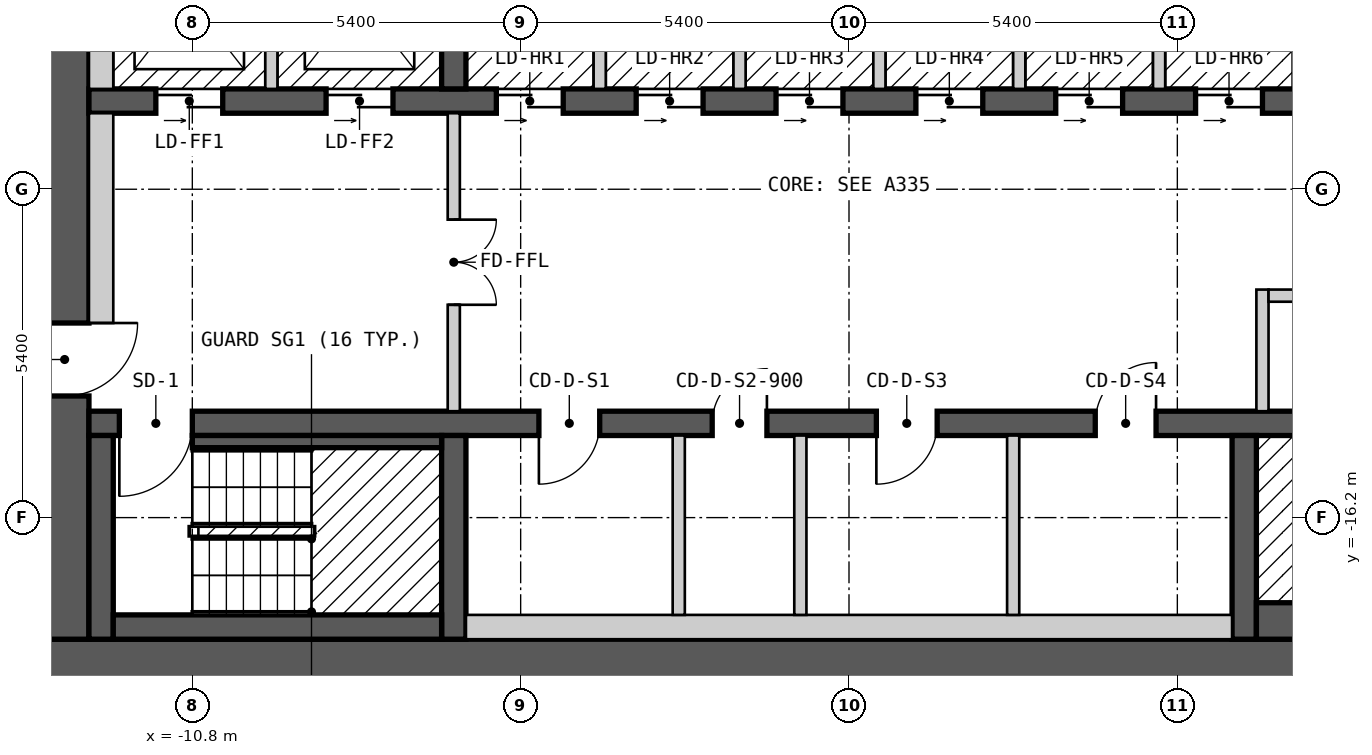
"""IFC4 building model, lengths in metres.
Left out: names, types, materials, properties, quantities, classifications, styles, units other than length and angle.
Written with IfcOpenShell. Run it as: python <this file> out.ifc"""

import sys

from ifc_helpers import new_model, si_unit, direction, frame, frame_2d, origin, place, context, subcontext, project, spatial, rectangle, extrude, element, fill, save


model = new_model("IFC4")
c1 = context("Model", 3, precision=1e-05, world=origin(), true_north=direction((0.0, 1.0)))
c2 = subcontext(c1, "Body", "Model", "MODEL_VIEW")
j1 = project(units=[si_unit("LENGTHUNIT", "METRE"), si_unit("PLANEANGLEUNIT", "RADIAN")], contexts=[c1])
p1 = place(None, origin())
s1 = spatial("IfcSite", under=j1, at=p1, CompositionType="ELEMENT")
p2 = place(p1, origin())
s2 = spatial("IfcBuilding", under=s1, at=p2, CompositionType="ELEMENT")
p3 = place(p2, frame((0.0, 0.0, 126.6)))
s3 = spatial("IfcBuildingStorey", under=s2, at=p3, CompositionType="ELEMENT", Elevation=126.6)
p4 = place(p3, frame((-13.3, -18.6, 0.0), z_axis=(0.0, 0.0, 1.0), x_axis=(1.0, 0.0, 0.0)))
e1 = element("IfcWall", 1, at=p4, inside=s3, PredefinedType="SHEAR", context=c2, shape_type="SweptSolid", body=[
    extrude(rectangle(XDim=26.6, YDim=0.8, at=frame_2d((13.3, 0.0))), origin(), (0.0, 0.0, 1.0), 2.7),
])
p5 = place(p3, frame((-12.9, -18.2, 0.0), z_axis=(0.0, 0.0, 1.0), x_axis=(0.0, 1.0, 0.0)))
e2 = element("IfcWall", 2, at=p5, inside=s3, PredefinedType="SHEAR", context=c2, shape_type="SweptSolid", body=[
    extrude(rectangle(XDim=12.4, YDim=0.8, at=frame_2d((6.2, 0.0))), origin(), (0.0, 0.0, 1.0), 2.7),
])
p6 = place(p5, frame((4.0, 0.0, 0.0)))
e3 = element("IfcOpeningElement", 3, at=p6, cuts=e2, PredefinedType="OPENING", context=c2, shape_type="SweptSolid", body=[
    extrude(rectangle(XDim=1.2, YDim=2.1, at=frame_2d((0.6, 1.05))), frame((0.0, 0.41, 0.0), z_axis=(0.0, -1.0, 0.0), x_axis=(1.0, 0.0, 0.0)), (0.0, 0.0, 1.0), 0.82),
])
p7 = place(p3, frame((-12.5, -14.65, 0.0), z_axis=(0.0, 0.0, 1.0), x_axis=(1.0, 0.0, 0.0)))
e4 = element("IfcWall", 4, at=p7, inside=s3, PredefinedType="SHEAR", context=c2, shape_type="SweptSolid", body=[
    extrude(rectangle(XDim=25.0, YDim=0.4, at=frame_2d((12.5, 0.0))), origin(), (0.0, 0.0, 1.0), 2.7),
])
p8 = place(p7, frame((1.7, 0.0, 0.0), z_axis=(0.0, 0.0, 1.0), x_axis=(-1.0, 0.0, 0.0)))
e5 = element("IfcOpeningElement", 5, at=p8, cuts=e4, PredefinedType="OPENING", context=c2, shape_type="SweptSolid", body=[
    extrude(rectangle(XDim=1.2, YDim=2.1, at=frame_2d((0.6, 1.05))), frame((0.0, 0.21, 0.0), z_axis=(0.0, -1.0, 0.0), x_axis=(1.0, 0.0, 0.0)), (0.0, 0.0, 1.0), 0.42),
])
p9 = place(p7, frame((24.55, 0.0, 0.0), z_axis=(0.0, 0.0, 1.0), x_axis=(-1.0, 0.0, 0.0)))
e6 = element("IfcOpeningElement", 6, at=p9, cuts=e4, PredefinedType="OPENING", context=c2, shape_type="SweptSolid", body=[
    extrude(rectangle(XDim=1.2, YDim=2.1, at=frame_2d((0.6, 1.05))), frame((0.0, 0.21, 0.0), z_axis=(0.0, -1.0, 0.0), x_axis=(1.0, 0.0, 0.0)), (0.0, 0.0, 1.0), 0.42),
])
p10 = place(p7, frame((8.4, 0.0, 0.0), z_axis=(0.0, 0.0, 1.0), x_axis=(-1.0, 0.0, 0.0)))
e7 = element("IfcOpeningElement", 7, at=p10, cuts=e4, PredefinedType="OPENING", context=c2, shape_type="SweptSolid", body=[
    extrude(rectangle(XDim=1.0, YDim=2.1, at=frame_2d((0.5, 1.05))), frame((0.0, 0.21, 0.0), z_axis=(0.0, -1.0, 0.0), x_axis=(1.0, 0.0, 0.0)), (0.0, 0.0, 1.0), 0.42),
])
p11 = place(p7, frame((11.15, 0.0, 0.0), z_axis=(0.0, 0.0, 1.0), x_axis=(-1.0, 0.0, 0.0)))
e8 = element("IfcOpeningElement", 8, at=p11, cuts=e4, PredefinedType="OPENING", context=c2, shape_type="SweptSolid", body=[
    extrude(rectangle(XDim=0.9, YDim=2.1, at=frame_2d((0.45, 1.05))), frame((0.0, 0.21, 0.0), z_axis=(0.0, -1.0, 0.0), x_axis=(1.0, 0.0, 0.0)), (0.0, 0.0, 1.0), 0.42),
])
p12 = place(p7, frame((13.95, 0.0, 0.0), z_axis=(0.0, 0.0, 1.0), x_axis=(-1.0, 0.0, 0.0)))
e9 = element("IfcOpeningElement", 9, at=p12, cuts=e4, PredefinedType="OPENING", context=c2, shape_type="SweptSolid", body=[
    extrude(rectangle(XDim=1.0, YDim=2.1, at=frame_2d((0.5, 1.05))), frame((0.0, 0.21, 0.0), z_axis=(0.0, -1.0, 0.0), x_axis=(1.0, 0.0, 0.0)), (0.0, 0.0, 1.0), 0.42),
])
p13 = place(p7, frame((17.55, 0.0, 0.0), z_axis=(0.0, 0.0, 1.0), x_axis=(-1.0, 0.0, 0.0)))
e10 = element("IfcOpeningElement", 10, at=p13, cuts=e4, PredefinedType="OPENING", context=c2, shape_type="SweptSolid", body=[
    extrude(rectangle(XDim=1.0, YDim=2.1, at=frame_2d((0.5, 1.05))), frame((0.0, 0.21, 0.0), z_axis=(0.0, -1.0, 0.0), x_axis=(1.0, 0.0, 0.0)), (0.0, 0.0, 1.0), 0.42),
])
p14 = place(p3, frame((-12.5, -9.35, 0.0), z_axis=(0.0, 0.0, 1.0), x_axis=(1.0, 0.0, 0.0)))
e11 = element("IfcWall", 11, at=p14, inside=s3, PredefinedType="SHEAR", context=c2, shape_type="SweptSolid", body=[
    extrude(rectangle(XDim=22.7, YDim=0.4, at=frame_2d((11.35, 0.0))), origin(), (0.0, 0.0, 1.0), 2.7),
])
p15 = place(p14, frame((1.1, 0.0, 0.0)))
e12 = element("IfcOpeningElement", 12, at=p15, cuts=e11, PredefinedType="OPENING", context=c2, shape_type="SweptSolid", body=[
    extrude(rectangle(XDim=1.1, YDim=2.1, at=frame_2d((0.55, 1.05))), frame((0.0, 0.21, 0.0), z_axis=(0.0, -1.0, 0.0), x_axis=(1.0, 0.0, 0.0)), (0.0, 0.0, 1.0), 0.42),
])
p16 = place(p14, frame((3.9, 0.0, 0.0)))
e13 = element("IfcOpeningElement", 13, at=p16, cuts=e11, PredefinedType="OPENING", context=c2, shape_type="SweptSolid", body=[
    extrude(rectangle(XDim=1.1, YDim=2.1, at=frame_2d((0.55, 1.05))), frame((0.0, 0.21, 0.0), z_axis=(0.0, -1.0, 0.0), x_axis=(1.0, 0.0, 0.0)), (0.0, 0.0, 1.0), 0.42),
])
p17 = place(p14, frame((6.7, 0.0, 0.0)))
e14 = element("IfcOpeningElement", 14, at=p17, cuts=e11, PredefinedType="OPENING", context=c2, shape_type="SweptSolid", body=[
    extrude(rectangle(XDim=1.1, YDim=2.1, at=frame_2d((0.55, 1.05))), frame((0.0, 0.21, 0.0), z_axis=(0.0, -1.0, 0.0), x_axis=(1.0, 0.0, 0.0)), (0.0, 0.0, 1.0), 0.42),
])
p18 = place(p14, frame((9.0, 0.0, 0.0)))
e15 = element("IfcOpeningElement", 15, at=p18, cuts=e11, PredefinedType="OPENING", context=c2, shape_type="SweptSolid", body=[
    extrude(rectangle(XDim=1.1, YDim=2.1, at=frame_2d((0.55, 1.05))), frame((0.0, 0.21, 0.0), z_axis=(0.0, -1.0, 0.0), x_axis=(1.0, 0.0, 0.0)), (0.0, 0.0, 1.0), 0.42),
])
p19 = place(p14, frame((11.3, 0.0, 0.0)))
e16 = element("IfcOpeningElement", 16, at=p19, cuts=e11, PredefinedType="OPENING", context=c2, shape_type="SweptSolid", body=[
    extrude(rectangle(XDim=1.1, YDim=2.1, at=frame_2d((0.55, 1.05))), frame((0.0, 0.21, 0.0), z_axis=(0.0, -1.0, 0.0), x_axis=(1.0, 0.0, 0.0)), (0.0, 0.0, 1.0), 0.42),
])
p20 = place(p14, frame((13.6, 0.0, 0.0)))
e17 = element("IfcOpeningElement", 17, at=p20, cuts=e11, PredefinedType="OPENING", context=c2, shape_type="SweptSolid", body=[
    extrude(rectangle(XDim=1.1, YDim=2.1, at=frame_2d((0.55, 1.05))), frame((0.0, 0.21, 0.0), z_axis=(0.0, -1.0, 0.0), x_axis=(1.0, 0.0, 0.0)), (0.0, 0.0, 1.0), 0.42),
])
p21 = place(p14, frame((15.9, 0.0, 0.0)))
e18 = element("IfcOpeningElement", 18, at=p21, cuts=e11, PredefinedType="OPENING", context=c2, shape_type="SweptSolid", body=[
    extrude(rectangle(XDim=1.1, YDim=2.1, at=frame_2d((0.55, 1.05))), frame((0.0, 0.21, 0.0), z_axis=(0.0, -1.0, 0.0), x_axis=(1.0, 0.0, 0.0)), (0.0, 0.0, 1.0), 0.42),
])
p22 = place(p14, frame((18.2, 0.0, 0.0)))
e19 = element("IfcOpeningElement", 19, at=p22, cuts=e11, PredefinedType="OPENING", context=c2, shape_type="SweptSolid", body=[
    extrude(rectangle(XDim=1.1, YDim=2.1, at=frame_2d((0.55, 1.05))), frame((0.0, 0.21, 0.0), z_axis=(0.0, -1.0, 0.0), x_axis=(1.0, 0.0, 0.0)), (0.0, 0.0, 1.0), 0.42),
])
p23 = place(p14, frame((20.6, 0.0, 0.0)))
e20 = element("IfcOpeningElement", 20, at=p23, cuts=e11, PredefinedType="OPENING", context=c2, shape_type="SweptSolid", body=[
    extrude(rectangle(XDim=1.1, YDim=2.1, at=frame_2d((0.55, 1.05))), frame((0.0, 0.21, 0.0), z_axis=(0.0, -1.0, 0.0), x_axis=(1.0, 0.0, 0.0)), (0.0, 0.0, 1.0), 0.42),
])
for number, where, z_axis, x_axis in (
    (21, (-6.5, -18.2, 0.0), (0.0, 0.0, 1.0), (0.0, 1.0, 0.0)),
    (22, (6.5, -18.2, 0.0), (0.0, 0.0, 1.0), (0.0, 1.0, 0.0)),
    (23, (-6.5, -9.15, 0.0), (0.0, 0.0, 1.0), (0.0, 1.0, 0.0)),
):
    element("IfcWall", number, at=place(p3, frame(where, z_axis=z_axis, x_axis=x_axis)), inside=s3, PredefinedType="SHEAR", context=c2, shape_type="SweptSolid", body=[
        extrude(rectangle(XDim=3.35, YDim=0.4, at=frame_2d((1.675, 0.0))), origin(), (0.0, 0.0, 1.0), 2.7),
    ])
p24 = place(p3, frame((-12.3, -18.2, 0.0), z_axis=(0.0, 0.0, 1.0), x_axis=(0.0, 1.0, 0.0)))
e24 = element("IfcWall", 24, at=p24, inside=s3, PredefinedType="SOLIDWALL", context=c2, shape_type="SweptSolid", body=[
    extrude(rectangle(XDim=3.35, YDim=0.4, at=frame_2d((1.675, 0.0))), origin(), (0.0, 0.0, 1.0), 2.7),
])
p25 = place(p3, frame((-12.3, -13.0, 0.0), z_axis=(0.0, 0.0, 1.0), x_axis=(0.0, 1.0, 0.0)))
e25 = element("IfcWall", 25, at=p25, inside=s3, PredefinedType="PARTITIONING", context=c2, shape_type="SweptSolid", body=[
    extrude(rectangle(XDim=3.45, YDim=0.4, at=frame_2d((1.725, 0.0))), origin(), (0.0, 0.0, 1.0), 2.7),
])
p26 = place(p3, frame((-12.3, -9.15, 0.0), z_axis=(0.0, 0.0, 1.0), x_axis=(0.0, 1.0, 0.0)))
e26 = element("IfcWall", 26, at=p26, inside=s3, PredefinedType="SOLIDWALL", context=c2, shape_type="SweptSolid", body=[
    extrude(rectangle(XDim=3.35, YDim=0.4, at=frame_2d((1.675, 0.0))), origin(), (0.0, 0.0, 1.0), 2.7),
])
p27 = place(p3, frame((-12.1, -18.0, 0.0), z_axis=(0.0, 0.0, 1.0), x_axis=(1.0, 0.0, 0.0)))
e27 = element("IfcWall", 27, at=p27, inside=s3, PredefinedType="SOLIDWALL", context=c2, shape_type="SweptSolid", body=[
    extrude(rectangle(XDim=5.4, YDim=0.4, at=frame_2d((2.7, 0.0))), origin(), (0.0, 0.0, 1.0), 2.7),
])
p28 = place(p3, frame((-10.8, -14.95, 0.0), z_axis=(0.0, 0.0, 1.0), x_axis=(1.0, 0.0, 0.0)))
e28 = element("IfcWall", 28, at=p28, inside=s3, PredefinedType="SOLIDWALL", context=c2, shape_type="SweptSolid", body=[
    extrude(rectangle(XDim=4.1, YDim=0.2, at=frame_2d((2.05, 0.0))), origin(), (0.0, 0.0, 1.0), 2.7),
])
p29 = place(p3, frame((-9.5, -9.15, 0.0), z_axis=(0.0, 0.0, 1.0), x_axis=(0.0, 1.0, 0.0)))
e29 = element("IfcWall", 29, at=p29, inside=s3, PredefinedType="SOLIDWALL", context=c2, shape_type="SweptSolid", body=[
    extrude(rectangle(XDim=2.95, YDim=0.2, at=frame_2d((1.475, 0.0))), origin(), (0.0, 0.0, 1.0), 2.7),
])
p30 = place(p3, frame((-6.5, -14.45, 0.0), z_axis=(0.0, 0.0, 1.0), x_axis=(0.0, 1.0, 0.0)))
e30 = element("IfcWall", 30, at=p30, inside=s3, PredefinedType="PARTITIONING", context=c2, shape_type="SweptSolid", body=[
    extrude(rectangle(XDim=4.9, YDim=0.2, at=frame_2d((2.45, 0.0))), origin(), (0.0, 0.0, 1.0), 2.7),
])
p31 = place(p30, frame((3.15, 0.0, 0.0), z_axis=(0.0, 0.0, 1.0), x_axis=(-1.0, 0.0, 0.0)))
e31 = element("IfcOpeningElement", 31, at=p31, cuts=e30, PredefinedType="OPENING", context=c2, shape_type="SweptSolid", body=[
    extrude(rectangle(XDim=1.4, YDim=2.1, at=frame_2d((0.7, 1.05))), frame((0.0, 0.11, 0.0), z_axis=(0.0, -1.0, 0.0), x_axis=(1.0, 0.0, 0.0)), (0.0, 0.0, 1.0), 0.22),
])
p32 = place(p3, frame((-6.3, -18.0, 0.0), z_axis=(0.0, 0.0, 1.0), x_axis=(1.0, 0.0, 0.0)))
e32 = element("IfcWall", 32, at=p32, inside=s3, PredefinedType="PARTITIONING", context=c2, shape_type="SweptSolid", body=[
    extrude(rectangle(XDim=12.6, YDim=0.4, at=frame_2d((6.3, 0.0))), origin(), (0.0, 0.0, 1.0), 2.7),
])
p33 = place(p3, frame((-4.1, -9.15, 0.0), z_axis=(0.0, 0.0, 1.0), x_axis=(0.0, 1.0, 0.0)))
e33 = element("IfcWall", 33, at=p33, inside=s3, PredefinedType="SOLIDWALL", context=c2, shape_type="SweptSolid", body=[
    extrude(rectangle(XDim=2.95, YDim=0.2, at=frame_2d((1.475, 0.0))), origin(), (0.0, 0.0, 1.0), 2.7),
])
p34 = place(p3, frame((-2.8, -17.8, 0.0), z_axis=(0.0, 0.0, 1.0), x_axis=(0.0, 1.0, 0.0)))
e34 = element("IfcWall", 34, at=p34, inside=s3, PredefinedType="PARTITIONING", context=c2, shape_type="SweptSolid", body=[
    extrude(rectangle(XDim=2.95, YDim=0.2, at=frame_2d((1.475, 0.0))), origin(), (0.0, 0.0, 1.0), 2.7),
])
p35 = place(p3, frame((-1.8, -9.15, 0.0), z_axis=(0.0, 0.0, 1.0), x_axis=(0.0, 1.0, 0.0)))
e35 = element("IfcWall", 35, at=p35, inside=s3, PredefinedType="SOLIDWALL", context=c2, shape_type="SweptSolid", body=[
    extrude(rectangle(XDim=2.95, YDim=0.2, at=frame_2d((1.475, 0.0))), origin(), (0.0, 0.0, 1.0), 2.7),
])
p36 = place(p3, frame((-0.8, -17.8, 0.0), z_axis=(0.0, 0.0, 1.0), x_axis=(0.0, 1.0, 0.0)))
e36 = element("IfcWall", 36, at=p36, inside=s3, PredefinedType="PARTITIONING", context=c2, shape_type="SweptSolid", body=[
    extrude(rectangle(XDim=2.95, YDim=0.2, at=frame_2d((1.475, 0.0))), origin(), (0.0, 0.0, 1.0), 2.7),
])
p37 = place(p3, frame((0.5, -9.15, 0.0), z_axis=(0.0, 0.0, 1.0), x_axis=(0.0, 1.0, 0.0)))
e37 = element("IfcWall", 37, at=p37, inside=s3, PredefinedType="SOLIDWALL", context=c2, shape_type="SweptSolid", body=[
    extrude(rectangle(XDim=2.95, YDim=0.2, at=frame_2d((1.475, 0.0))), origin(), (0.0, 0.0, 1.0), 2.7),
])
p38 = place(p3, frame((2.7, -17.8, 0.0), z_axis=(0.0, 0.0, 1.0), x_axis=(0.0, 1.0, 0.0)))
e38 = element("IfcWall", 38, at=p38, inside=s3, PredefinedType="PARTITIONING", context=c2, shape_type="SweptSolid", body=[
    extrude(rectangle(XDim=2.95, YDim=0.2, at=frame_2d((1.475, 0.0))), origin(), (0.0, 0.0, 1.0), 2.7),
])
for number, where, z_axis, x_axis in (
    (39, (2.8, -9.15, 0.0), (0.0, 0.0, 1.0), (0.0, 1.0, 0.0)),
    (40, (5.1, -9.15, 0.0), (0.0, 0.0, 1.0), (0.0, 1.0, 0.0)),
):
    element("IfcWall", number, at=place(p3, frame(where, z_axis=z_axis, x_axis=x_axis)), inside=s3, PredefinedType="SOLIDWALL", context=c2, shape_type="SweptSolid", body=[
        extrude(rectangle(XDim=2.95, YDim=0.2, at=frame_2d((1.475, 0.0))), origin(), (0.0, 0.0, 1.0), 2.7),
    ])
p39 = place(p3, frame((6.7, -17.9, 0.0), z_axis=(0.0, 0.0, 1.0), x_axis=(1.0, 0.0, 0.0)))
e41 = element("IfcWall", 41, at=p39, inside=s3, PredefinedType="SOLIDWALL", context=c2, shape_type="SweptSolid", body=[
    extrude(rectangle(XDim=5.8, YDim=0.6, at=frame_2d((2.9, 0.0))), origin(), (0.0, 0.0, 1.0), 2.7),
])
p40 = place(p3, frame((6.8, -14.45, 0.0), z_axis=(0.0, 0.0, 1.0), x_axis=(0.0, 1.0, 0.0)))
e42 = element("IfcWall", 42, at=p40, inside=s3, PredefinedType="PARTITIONING", context=c2, shape_type="SweptSolid", body=[
    extrude(rectangle(XDim=2.0, YDim=0.2, at=frame_2d((1.0, 0.0))), origin(), (0.0, 0.0, 1.0), 2.7),
])
p41 = place(p3, frame((6.9, -12.55, 0.0), z_axis=(0.0, 0.0, 1.0), x_axis=(1.0, 0.0, 0.0)))
e43 = element("IfcWall", 43, at=p41, inside=s3, PredefinedType="PARTITIONING", context=c2, shape_type="SweptSolid", body=[
    extrude(rectangle(XDim=3.3, YDim=0.2, at=frame_2d((1.65, 0.0))), origin(), (0.0, 0.0, 1.0), 2.7),
])
p42 = place(p41, frame((2.05, 0.0, 0.0), z_axis=(0.0, 0.0, 1.0), x_axis=(-1.0, 0.0, 0.0)))
e44 = element("IfcOpeningElement", 44, at=p42, cuts=e43, PredefinedType="OPENING", context=c2, shape_type="SweptSolid", body=[
    extrude(rectangle(XDim=1.0, YDim=2.1, at=frame_2d((0.5, 1.05))), frame((0.0, 0.11, 0.0), z_axis=(0.0, -1.0, 0.0), x_axis=(1.0, 0.0, 0.0)), (0.0, 0.0, 1.0), 0.22),
])
p43 = place(p3, frame((7.4, -9.15, 0.0), z_axis=(0.0, 0.0, 1.0), x_axis=(0.0, 1.0, 0.0)))
e45 = element("IfcWall", 45, at=p43, inside=s3, PredefinedType="SOLIDWALL", context=c2, shape_type="SweptSolid", body=[
    extrude(rectangle(XDim=2.95, YDim=0.2, at=frame_2d((1.475, 0.0))), origin(), (0.0, 0.0, 1.0), 2.7),
])
p44 = place(p15, origin())
e46 = element("IfcDoor", 46, at=p44, inside=s3, OperationType="DOUBLE_DOOR_SLIDING", PredefinedType="DOOR", context=c2, shape_type="SweptSolid", body=[
    extrude(rectangle(XDim=1.1, YDim=2.1, at=frame_2d((0.55, 1.05))), frame((0.0, 0.025, 0.0), z_axis=(0.0, -1.0, 0.0), x_axis=(1.0, 0.0, 0.0)), (0.0, 0.0, 1.0), 0.05),
])
fill(e12, e46)
p45 = place(p16, origin())
e47 = element("IfcDoor", 47, at=p45, inside=s3, OperationType="DOUBLE_DOOR_SLIDING", PredefinedType="DOOR", context=c2, shape_type="SweptSolid", body=[
    extrude(rectangle(XDim=1.1, YDim=2.1, at=frame_2d((0.55, 1.05))), frame((0.0, 0.025, 0.0), z_axis=(0.0, -1.0, 0.0), x_axis=(1.0, 0.0, 0.0)), (0.0, 0.0, 1.0), 0.05),
])
fill(e13, e47)
p46 = place(p17, origin())
e48 = element("IfcDoor", 48, at=p46, inside=s3, OperationType="DOUBLE_DOOR_SLIDING", PredefinedType="DOOR", context=c2, shape_type="SweptSolid", body=[
    extrude(rectangle(XDim=1.1, YDim=2.1, at=frame_2d((0.55, 1.05))), frame((0.0, 0.025, 0.0), z_axis=(0.0, -1.0, 0.0), x_axis=(1.0, 0.0, 0.0)), (0.0, 0.0, 1.0), 0.05),
])
fill(e14, e48)
p47 = place(p18, origin())
e49 = element("IfcDoor", 49, at=p47, inside=s3, OperationType="DOUBLE_DOOR_SLIDING", PredefinedType="DOOR", context=c2, shape_type="SweptSolid", body=[
    extrude(rectangle(XDim=1.1, YDim=2.1, at=frame_2d((0.55, 1.05))), frame((0.0, 0.025, 0.0), z_axis=(0.0, -1.0, 0.0), x_axis=(1.0, 0.0, 0.0)), (0.0, 0.0, 1.0), 0.05),
])
fill(e15, e49)
p48 = place(p19, origin())
e50 = element("IfcDoor", 50, at=p48, inside=s3, OperationType="DOUBLE_DOOR_SLIDING", PredefinedType="DOOR", context=c2, shape_type="SweptSolid", body=[
    extrude(rectangle(XDim=1.1, YDim=2.1, at=frame_2d((0.55, 1.05))), frame((0.0, 0.025, 0.0), z_axis=(0.0, -1.0, 0.0), x_axis=(1.0, 0.0, 0.0)), (0.0, 0.0, 1.0), 0.05),
])
fill(e16, e50)
p49 = place(p20, origin())
e51 = element("IfcDoor", 51, at=p49, inside=s3, OperationType="DOUBLE_DOOR_SLIDING", PredefinedType="DOOR", context=c2, shape_type="SweptSolid", body=[
    extrude(rectangle(XDim=1.1, YDim=2.1, at=frame_2d((0.55, 1.05))), frame((0.0, 0.025, 0.0), z_axis=(0.0, -1.0, 0.0), x_axis=(1.0, 0.0, 0.0)), (0.0, 0.0, 1.0), 0.05),
])
fill(e17, e51)
p50 = place(p21, origin())
e52 = element("IfcDoor", 52, at=p50, inside=s3, OperationType="DOUBLE_DOOR_SLIDING", PredefinedType="DOOR", context=c2, shape_type="SweptSolid", body=[
    extrude(rectangle(XDim=1.1, YDim=2.1, at=frame_2d((0.55, 1.05))), frame((0.0, 0.025, 0.0), z_axis=(0.0, -1.0, 0.0), x_axis=(1.0, 0.0, 0.0)), (0.0, 0.0, 1.0), 0.05),
])
fill(e18, e52)
p51 = place(p22, origin())
e53 = element("IfcDoor", 53, at=p51, inside=s3, OperationType="DOUBLE_DOOR_SLIDING", PredefinedType="DOOR", context=c2, shape_type="SweptSolid", body=[
    extrude(rectangle(XDim=1.1, YDim=2.1, at=frame_2d((0.55, 1.05))), frame((0.0, 0.025, 0.0), z_axis=(0.0, -1.0, 0.0), x_axis=(1.0, 0.0, 0.0)), (0.0, 0.0, 1.0), 0.05),
])
fill(e19, e53)
p52 = place(p8, origin())
e54 = element("IfcDoor", 54, at=p52, inside=s3, OperationType="SINGLE_SWING_RIGHT", PredefinedType="DOOR", context=c2, shape_type="SweptSolid", body=[
    extrude(rectangle(XDim=1.2, YDim=2.1, at=frame_2d((0.6, 1.05))), frame((0.0, 0.025, 0.0), z_axis=(0.0, -1.0, 0.0), x_axis=(1.0, 0.0, 0.0)), (0.0, 0.0, 1.0), 0.05),
])
fill(e5, e54)
p53 = place(p6, origin())
e55 = element("IfcDoor", 55, at=p53, inside=s3, OperationType="SINGLE_SWING_RIGHT", PredefinedType="DOOR", context=c2, shape_type="SweptSolid", body=[
    extrude(rectangle(XDim=1.2, YDim=2.1, at=frame_2d((0.6, 1.05))), frame((0.0, 0.025, 0.0), z_axis=(0.0, -1.0, 0.0), x_axis=(1.0, 0.0, 0.0)), (0.0, 0.0, 1.0), 0.05),
])
fill(e3, e55)
p54 = place(p31, origin())
e56 = element("IfcDoor", 56, at=p54, inside=s3, OperationType="DOUBLE_DOOR_SINGLE_SWING", PredefinedType="DOOR", context=c2, shape_type="SweptSolid", body=[
    extrude(rectangle(XDim=1.4, YDim=2.1, at=frame_2d((0.7, 1.05))), frame((0.0, 0.025, 0.0), z_axis=(0.0, -1.0, 0.0), x_axis=(1.0, 0.0, 0.0)), (0.0, 0.0, 1.0), 0.05),
])
fill(e31, e56)
p55 = place(p10, origin())
e57 = element("IfcDoor", 57, at=p55, inside=s3, OperationType="SINGLE_SWING_RIGHT", PredefinedType="DOOR", context=c2, shape_type="SweptSolid", body=[
    extrude(rectangle(XDim=1.0, YDim=2.1, at=frame_2d((0.5, 1.05))), frame((0.0, 0.025, 0.0), z_axis=(0.0, -1.0, 0.0), x_axis=(1.0, 0.0, 0.0)), (0.0, 0.0, 1.0), 0.05),
])
fill(e7, e57)
p56 = place(p11, origin())
e58 = element("IfcDoor", 58, at=p56, inside=s3, OperationType="SINGLE_SWING_LEFT", PredefinedType="DOOR", context=c2, shape_type="SweptSolid", body=[
    extrude(rectangle(XDim=0.9, YDim=2.1, at=frame_2d((0.45, 1.05))), frame((0.0, 0.025, 0.0), z_axis=(0.0, -1.0, 0.0), x_axis=(1.0, 0.0, 0.0)), (0.0, 0.0, 1.0), 0.05),
])
fill(e8, e58)
p57 = place(p12, origin())
e59 = element("IfcDoor", 59, at=p57, inside=s3, OperationType="SINGLE_SWING_RIGHT", PredefinedType="DOOR", context=c2, shape_type="SweptSolid", body=[
    extrude(rectangle(XDim=1.0, YDim=2.1, at=frame_2d((0.5, 1.05))), frame((0.0, 0.025, 0.0), z_axis=(0.0, -1.0, 0.0), x_axis=(1.0, 0.0, 0.0)), (0.0, 0.0, 1.0), 0.05),
])
fill(e9, e59)
p58 = place(p13, origin())
e60 = element("IfcDoor", 60, at=p58, inside=s3, OperationType="SINGLE_SWING_LEFT", PredefinedType="DOOR", context=c2, shape_type="SweptSolid", body=[
    extrude(rectangle(XDim=1.0, YDim=2.1, at=frame_2d((0.5, 1.05))), frame((0.0, 0.025, 0.0), z_axis=(0.0, -1.0, 0.0), x_axis=(1.0, 0.0, 0.0)), (0.0, 0.0, 1.0), 0.05),
])
fill(e10, e60)
save(model, sys.argv[1])
